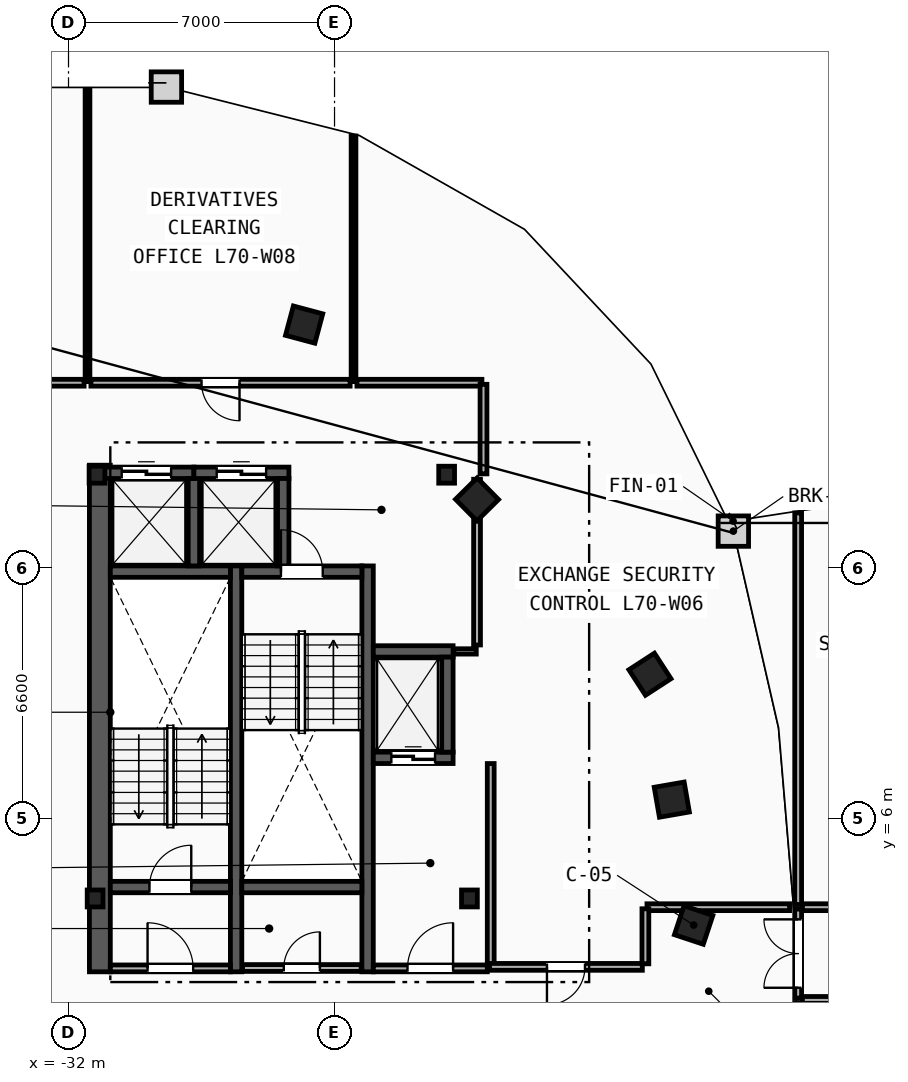
"""IFC4 building model, lengths in metres.
Left out: names, types, materials, properties, quantities, classifications, styles, units other than length and angle.
Written with IfcOpenShell. Run it as: python <this file> out.ifc"""

import sys

from ifc_helpers import new_model, si_unit, direction, frame, frame_2d, origin, origin_2d, place, context, subcontext, project, spatial, rectangle, i_section, extrude, element, fill, save


model = new_model("IFC4")
c1 = context("Model", 3, precision=1e-05, world=origin(), true_north=direction((0.0, 1.0)))
c2 = subcontext(c1, "Body", "Model", "MODEL_VIEW")
j1 = project(units=[si_unit("LENGTHUNIT", "METRE"), si_unit("PLANEANGLEUNIT", "RADIAN")], contexts=[c1])
p1 = place(None, origin())
s1 = spatial("IfcSite", under=j1, at=p1, CompositionType="ELEMENT")
p2 = place(p1, origin())
s2 = spatial("IfcBuilding", under=s1, at=p2, CompositionType="ELEMENT")
p3 = place(p2, frame((0.0, 0.0, 264.8)))
s3 = spatial("IfcBuildingStorey", under=s2, at=p3, CompositionType="ELEMENT", Elevation=264.8)
for number, where, z_axis, x_axis in (
    (1, (-31.3, 3.9, 0.0), (0.0, 0.0, 1.0), (1.0, 0.0, 0.0)),
    (2, (-21.45, 3.9, 0.0), (0.0, 0.0, 1.0), (1.0, 0.0, 0.0)),
    (3, (-22.05, 15.05, 0.0), (0.0, 0.0, 1.0), (1.0, 0.0, 0.0)),
    (4, (-31.25, 15.05, 0.0), (0.0, 0.0, 1.0), (1.0, 0.0, 0.0)),
):
    element("IfcColumn", number, at=place(p3, frame(where, z_axis=z_axis, x_axis=x_axis)), inside=s3, PredefinedType="COLUMN", context=c2, shape_type="SweptSolid", body=[
        extrude(i_section(OverallWidth=0.416, OverallDepth=0.446, WebThickness=0.039, FlangeThickness=0.063, FilletRadius=0.018, at=origin_2d()), origin(), (0.0, 0.0, 1.0), 3.6),
    ])
for number, where, z_axis, x_axis in (
    (5, (-15.55, 3.2, 0.0), (0.0, 0.0, 1.0), (0.315, 0.949, 0.0)),
    (6, (-16.125, 6.5, 0.0), (0.0, 0.0, 1.0), (-0.172, 0.985, 0.0)),
    (7, (-16.7, 9.8, 0.0), (0.0, 0.0, 1.0), (-0.544, 0.839, 0.0)),
    (8, (-21.25, 14.4, 0.0), (0.0, 0.0, 1.0), (-0.703, 0.711, 0.0)),
    (9, (-25.8, 19.0, 0.0), (0.0, 0.0, 1.0), (-0.966, 0.259, 0.0)),
):
    element("IfcColumn", number, at=place(p3, frame(where, z_axis=z_axis, x_axis=x_axis)), inside=s3, PredefinedType="COLUMN", context=c2, shape_type="SweptSolid", body=[
        extrude(rectangle(XDim=0.8, YDim=0.8, at=origin_2d()), origin(), (0.0, 0.0, 1.0), 3.6),
    ])
p4 = place(p3, frame((-31.175, 1.97, 0.0), z_axis=(0.0, 0.0, 1.0), x_axis=(0.0, 1.0, 0.0)))
e10 = element("IfcWall", 10, at=p4, inside=s3, PredefinedType="SHEAR", context=c2, shape_type="SweptSolid", body=[
    extrude(rectangle(XDim=13.33, YDim=0.55, at=frame_2d((6.665, 0.0))), origin(), (0.0, 0.0, 1.0), 3.34),
])
for number, where, z_axis, x_axis in (
    (11, (-27.59, 1.97, 0.0), (0.0, 0.0, 1.0), (0.0, 1.0, 0.0)),
    (12, (-24.13, 1.97, 0.0), (0.0, 0.0, 1.0), (0.0, 1.0, 0.0)),
):
    element("IfcWall", number, at=place(p3, frame(where, z_axis=z_axis, x_axis=x_axis)), inside=s3, PredefinedType="SHEAR", context=c2, shape_type="SweptSolid", body=[
        extrude(rectangle(XDim=10.68, YDim=0.3, at=frame_2d((5.34, 0.0))), origin(), (0.0, 0.0, 1.0), 3.34),
    ])
p5 = place(p3, frame((-30.9, 4.2, 0.0), z_axis=(0.0, 0.0, 1.0), x_axis=(1.0, 0.0, 0.0)))
e13 = element("IfcWall", 13, at=p5, inside=s3, PredefinedType="SHEAR", context=c2, shape_type="SweptSolid", body=[
    extrude(rectangle(XDim=3.16, YDim=0.3, at=frame_2d((1.58, 0.0))), origin(), (0.0, 0.0, 1.0), 3.34),
])
p6 = place(p5, frame((1.03, 0.0, 0.0)))
e14 = element("IfcOpeningElement", 14, at=p6, cuts=e13, PredefinedType="OPENING", context=c2, shape_type="SweptSolid", body=[
    extrude(rectangle(XDim=1.1, YDim=2.15, at=frame_2d((0.55, 1.075))), frame((0.0, 0.16, 0.0), z_axis=(0.0, -1.0, 0.0), x_axis=(1.0, 0.0, 0.0)), (0.0, 0.0, 1.0), 0.32),
])
p7 = place(p3, frame((-30.9, 12.5, 0.0), z_axis=(0.0, 0.0, 1.0), x_axis=(1.0, 0.0, 0.0)))
e15 = element("IfcWall", 15, at=p7, inside=s3, PredefinedType="SHEAR", context=c2, shape_type="SweptSolid", body=[
    extrude(rectangle(XDim=3.16, YDim=0.3, at=frame_2d((1.58, 0.0))), origin(), (0.0, 0.0, 1.0), 3.34),
])
p8 = place(p3, frame((-27.44, 12.5, 0.0), z_axis=(0.0, 0.0, 1.0), x_axis=(1.0, 0.0, 0.0)))
e16 = element("IfcWall", 16, at=p8, inside=s3, PredefinedType="SHEAR", context=c2, shape_type="SweptSolid", body=[
    extrude(rectangle(XDim=3.16, YDim=0.3, at=frame_2d((1.58, 0.0))), origin(), (0.0, 0.0, 1.0), 3.34),
])
p9 = place(p8, frame((1.03, 0.0, 0.0)))
e17 = element("IfcOpeningElement", 17, at=p9, cuts=e16, PredefinedType="OPENING", context=c2, shape_type="SweptSolid", body=[
    extrude(rectangle(XDim=1.1, YDim=2.15, at=frame_2d((0.55, 1.075))), frame((0.0, 0.16, 0.0), z_axis=(0.0, -1.0, 0.0), x_axis=(1.0, 0.0, 0.0)), (0.0, 0.0, 1.0), 0.32),
])
p10 = place(p3, frame((-27.44, 4.2, 0.0), z_axis=(0.0, 0.0, 1.0), x_axis=(1.0, 0.0, 0.0)))
e18 = element("IfcWall", 18, at=p10, inside=s3, PredefinedType="SHEAR", context=c2, shape_type="SweptSolid", body=[
    extrude(rectangle(XDim=3.16, YDim=0.3, at=frame_2d((1.58, 0.0))), origin(), (0.0, 0.0, 1.0), 3.34),
])
p11 = place(p3, frame((-20.89, 2.15, 0.0), z_axis=(0.0, 0.0, 1.0), x_axis=(0.0, 1.0, 0.0)))
e19 = element("IfcWall", 19, at=p11, inside=s3, PredefinedType="PARTITIONING", context=c2, shape_type="SweptSolid", body=[
    extrude(rectangle(XDim=5.3, YDim=0.18, at=frame_2d((2.65, 0.0))), origin(), (0.0, 0.0, 1.0), 3.34),
])
p12 = place(p3, frame((-23.98, 2.06, 0.0), z_axis=(0.0, 0.0, 1.0), x_axis=(1.0, 0.0, 0.0)))
e20 = element("IfcWall", 20, at=p12, inside=s3, PredefinedType="PARTITIONING", context=c2, shape_type="SweptSolid", body=[
    extrude(rectangle(XDim=3.0, YDim=0.18, at=frame_2d((1.5, 0.0))), origin(), (0.0, 0.0, 1.0), 3.34),
])
p13 = place(p12, frame((0.9, 0.0, 0.0)))
e21 = element("IfcOpeningElement", 21, at=p13, cuts=e20, PredefinedType="OPENING", context=c2, shape_type="SweptSolid", body=[
    extrude(rectangle(XDim=1.2, YDim=2.15, at=frame_2d((0.6, 1.075))), frame((0.0, 0.1, 0.0), z_axis=(0.0, -1.0, 0.0), x_axis=(1.0, 0.0, 0.0)), (0.0, 0.0, 1.0), 0.2),
])
p14 = place(p3, frame((-30.9, 2.06, 0.0), z_axis=(0.0, 0.0, 1.0), x_axis=(1.0, 0.0, 0.0)))
e22 = element("IfcWall", 22, at=p14, inside=s3, PredefinedType="PARTITIONING", context=c2, shape_type="SweptSolid", body=[
    extrude(rectangle(XDim=3.16, YDim=0.18, at=frame_2d((1.58, 0.0))), origin(), (0.0, 0.0, 1.0), 3.34),
])
p15 = place(p14, frame((0.98, 0.0, 0.0)))
e23 = element("IfcOpeningElement", 23, at=p15, cuts=e22, PredefinedType="OPENING", context=c2, shape_type="SweptSolid", body=[
    extrude(rectangle(XDim=1.2, YDim=2.15, at=frame_2d((0.6, 1.075))), frame((0.0, 0.1, 0.0), z_axis=(0.0, -1.0, 0.0), x_axis=(1.0, 0.0, 0.0)), (0.0, 0.0, 1.0), 0.2),
])
p16 = place(p3, frame((-23.98, 7.6, 0.0), z_axis=(0.0, 0.0, 1.0), x_axis=(1.0, 0.0, 0.0)))
e24 = element("IfcWall", 24, at=p16, inside=s3, PredefinedType="SHEAR", context=c2, shape_type="SweptSolid", body=[
    extrude(rectangle(XDim=2.1, YDim=0.3, at=frame_2d((1.05, 0.0))), origin(), (0.0, 0.0, 1.0), 3.34),
])
p17 = place(p16, frame((0.475, 0.0, 0.0)))
e25 = element("IfcOpeningElement", 25, at=p17, cuts=e24, PredefinedType="OPENING", context=c2, shape_type="SweptSolid", body=[
    extrude(rectangle(XDim=1.15, YDim=2.2, at=frame_2d((0.575, 1.1))), frame((0.0, 0.16, 0.0), z_axis=(0.0, -1.0, 0.0), x_axis=(1.0, 0.0, 0.0)), (0.0, 0.0, 1.0), 0.32),
])
p18 = place(p3, frame((-23.98, 10.4, 0.0), z_axis=(0.0, 0.0, 1.0), x_axis=(1.0, 0.0, 0.0)))
e26 = element("IfcWall", 26, at=p18, inside=s3, PredefinedType="SHEAR", context=c2, shape_type="SweptSolid", body=[
    extrude(rectangle(XDim=2.1, YDim=0.3, at=frame_2d((1.05, 0.0))), origin(), (0.0, 0.0, 1.0), 3.34),
])
p19 = place(p3, frame((-22.03, 7.75, 0.0), z_axis=(0.0, 0.0, 1.0), x_axis=(0.0, 1.0, 0.0)))
e27 = element("IfcWall", 27, at=p19, inside=s3, PredefinedType="SHEAR", context=c2, shape_type="SweptSolid", body=[
    extrude(rectangle(XDim=2.5, YDim=0.3, at=frame_2d((1.25, 0.0))), origin(), (0.0, 0.0, 1.0), 3.34),
])
p20 = place(p3, frame((-31.2, 15.1, 0.0), z_axis=(0.0, 0.0, 1.0), x_axis=(1.0, 0.0, 0.0)))
e28 = element("IfcWall", 28, at=p20, inside=s3, PredefinedType="SHEAR", context=c2, shape_type="SweptSolid", body=[
    extrude(rectangle(XDim=2.5, YDim=0.3, at=frame_2d((1.25, 0.0))), origin(), (0.0, 0.0, 1.0), 3.34),
])
p21 = place(p20, frame((0.6, 0.0, 0.0)))
e29 = element("IfcOpeningElement", 29, at=p21, cuts=e28, PredefinedType="OPENING", context=c2, shape_type="SweptSolid", body=[
    extrude(rectangle(XDim=1.3, YDim=2.2, at=frame_2d((0.65, 1.1))), frame((0.0, 0.16, 0.0), z_axis=(0.0, -1.0, 0.0), x_axis=(1.0, 0.0, 0.0)), (0.0, 0.0, 1.0), 0.32),
])
p22 = place(p3, frame((-28.7, 12.65, 0.0), z_axis=(0.0, 0.0, 1.0), x_axis=(0.0, 1.0, 0.0)))
e30 = element("IfcWall", 30, at=p22, inside=s3, PredefinedType="SHEAR", context=c2, shape_type="SweptSolid", body=[
    extrude(rectangle(XDim=2.3, YDim=0.3, at=frame_2d((1.15, 0.0))), origin(), (0.0, 0.0, 1.0), 3.34),
])
p23 = place(p3, frame((-28.7, 15.1, 0.0), z_axis=(0.0, 0.0, 1.0), x_axis=(1.0, 0.0, 0.0)))
e31 = element("IfcWall", 31, at=p23, inside=s3, PredefinedType="SHEAR", context=c2, shape_type="SweptSolid", body=[
    extrude(rectangle(XDim=2.5, YDim=0.3, at=frame_2d((1.25, 0.0))), origin(), (0.0, 0.0, 1.0), 3.34),
])
p24 = place(p23, frame((0.6, 0.0, 0.0)))
e32 = element("IfcOpeningElement", 32, at=p24, cuts=e31, PredefinedType="OPENING", context=c2, shape_type="SweptSolid", body=[
    extrude(rectangle(XDim=1.3, YDim=2.2, at=frame_2d((0.65, 1.1))), frame((0.0, 0.16, 0.0), z_axis=(0.0, -1.0, 0.0), x_axis=(1.0, 0.0, 0.0)), (0.0, 0.0, 1.0), 0.32),
])
p25 = place(p3, frame((-26.35, 12.65, 0.0), z_axis=(0.0, 0.0, 1.0), x_axis=(0.0, 1.0, 0.0)))
e33 = element("IfcWall", 33, at=p25, inside=s3, PredefinedType="SHEAR", context=c2, shape_type="SweptSolid", body=[
    extrude(rectangle(XDim=2.3, YDim=0.3, at=frame_2d((1.15, 0.0))), origin(), (0.0, 0.0, 1.0), 3.34),
])
p26 = place(p3, frame((-21.86, 10.4, 0.0), z_axis=(0.0, 0.0, 1.0), x_axis=(1.0, 0.0, 0.0)))
e34 = element("IfcWall", 34, at=p26, inside=s3, PredefinedType="PARTITIONING", context=c2, shape_type="SweptSolid", body=[
    extrude(rectangle(XDim=0.59, YDim=0.14, at=frame_2d((0.295, 0.0))), origin(), (0.0, 0.0, 1.0), 3.34),
])
p27 = place(p3, frame((-21.25, 10.57, 0.0), z_axis=(0.0, 0.0, 1.0), x_axis=(0.0, 1.0, 0.0)))
e35 = element("IfcWall", 35, at=p27, inside=s3, PredefinedType="PARTITIONING", context=c2, shape_type="SweptSolid", body=[
    extrude(rectangle(XDim=4.36, YDim=0.18, at=frame_2d((2.18, 0.0))), origin(), (0.0, 0.0, 1.0), 3.34),
])
p28 = place(p3, frame((-27.42, 2.07, 0.0), z_axis=(0.0, 0.0, 1.0), x_axis=(1.0, 0.0, 0.0)))
e36 = element("IfcWall", 36, at=p28, inside=s3, PredefinedType="PARTITIONING", context=c2, shape_type="SweptSolid", body=[
    extrude(rectangle(XDim=3.12, YDim=0.18, at=frame_2d((1.56, 0.0))), origin(), (0.0, 0.0, 1.0), 3.34),
])
p29 = place(p28, frame((1.085, 0.0, 0.0)))
e37 = element("IfcOpeningElement", 37, at=p29, cuts=e36, PredefinedType="OPENING", context=c2, shape_type="SweptSolid", body=[
    extrude(rectangle(XDim=0.95, YDim=2.1, at=frame_2d((0.475, 1.05))), frame((0.0, 0.1, 0.0), z_axis=(0.0, -1.0, 0.0), x_axis=(1.0, 0.0, 0.0)), (0.0, 0.0, 1.0), 0.2),
])
p30 = place(p3, frame((-31.5, 17.5, 0.0), z_axis=(0.0, 0.0, 1.0), x_axis=(0.0, 1.0, 0.0)))
e38 = element("IfcWall", 38, at=p30, inside=s3, PredefinedType="PARTITIONING", context=c2, shape_type="SweptSolid", body=[
    extrude(rectangle(XDim=7.69, YDim=0.125, at=frame_2d((3.845, 0.0))), origin(), (0.0, 0.0, 1.0), 3.34),
])
p31 = place(p3, frame((-24.5, 17.5, 0.0), z_axis=(0.0, 0.0, 1.0), x_axis=(0.0, 1.0, 0.0)))
e39 = element("IfcWall", 39, at=p31, inside=s3, PredefinedType="PARTITIONING", context=c2, shape_type="SweptSolid", body=[
    extrude(rectangle(XDim=6.463, YDim=0.125, at=frame_2d((3.231, 0.0))), origin(), (0.0, 0.0, 1.0), 3.34),
])
p32 = place(p3, frame((-16.9, 2.1, 0.0), z_axis=(0.0, 0.0, 1.0), x_axis=(-1.0, 0.0, 0.0)))
e40 = element("IfcWall", 40, at=p32, inside=s3, PredefinedType="PARTITIONING", context=c2, shape_type="SweptSolid", body=[
    extrude(rectangle(XDim=4.02, YDim=0.18, at=frame_2d((2.01, 0.0))), origin(), (0.0, 0.0, 1.0), 3.34),
])
p33 = place(p32, frame((1.51, 0.0, 0.0)))
e41 = element("IfcOpeningElement", 41, at=p33, cuts=e40, PredefinedType="OPENING", context=c2, shape_type="SweptSolid", body=[
    extrude(rectangle(XDim=1.0, YDim=2.15, at=frame_2d((0.5, 1.075))), frame((0.0, 0.1, 0.0), z_axis=(0.0, -1.0, 0.0), x_axis=(1.0, 0.0, 0.0)), (0.0, 0.0, 1.0), 0.2),
])
p34 = place(p3, frame((-13.026, 3.67, 0.0), z_axis=(0.0, 0.0, 1.0), x_axis=(-1.0, 0.0, 0.0)))
e42 = element("IfcWall", 42, at=p34, inside=s3, PredefinedType="PARTITIONING", context=c2, shape_type="SweptSolid", body=[
    extrude(rectangle(XDim=3.753, YDim=0.18, at=frame_2d((1.876, 0.0))), origin(), (0.0, 0.0, 1.0), 3.34),
])
p35 = place(p3, frame((-21.122, 17.47, 0.0), z_axis=(0.0, 0.0, 1.0), x_axis=(-1.0, 0.0, 0.0)))
e43 = element("IfcWall", 43, at=p35, inside=s3, PredefinedType="PARTITIONING", context=c2, shape_type="SweptSolid", body=[
    extrude(rectangle(XDim=3.288, YDim=0.18, at=frame_2d((1.644, 0.0))), origin(), (0.0, 0.0, 1.0), 3.34),
])
p36 = place(p3, frame((-21.08, 15.072, 0.0), z_axis=(0.0, 0.0, 1.0), x_axis=(0.0, 1.0, 0.0)))
e44 = element("IfcWall", 44, at=p36, inside=s3, PredefinedType="PARTITIONING", context=c2, shape_type="SweptSolid", body=[
    extrude(rectangle(XDim=2.357, YDim=0.18, at=frame_2d((1.178, 0.0))), origin(), (0.0, 0.0, 1.0), 3.34),
])
p37 = place(p3, frame((-16.82, 3.628, 0.0), z_axis=(0.0, 0.0, 1.0), x_axis=(0.0, -1.0, 0.0)))
e45 = element("IfcWall", 45, at=p37, inside=s3, PredefinedType="PARTITIONING", context=c2, shape_type="SweptSolid", body=[
    extrude(rectangle(XDim=1.448, YDim=0.18, at=frame_2d((0.724, 0.0))), origin(), (0.0, 0.0, 1.0), 3.34),
])
p38 = place(p3, frame((-31.59, 17.47, 0.0), z_axis=(0.0, 0.0, 1.0), x_axis=(-1.0, 0.0, 0.0)))
e46 = element("IfcWall", 46, at=p38, inside=s3, PredefinedType="PARTITIONING", context=c2, shape_type="SweptSolid", body=[
    extrude(rectangle(XDim=2.038, YDim=0.18, at=frame_2d((1.019, 0.0))), origin(), (0.0, 0.0, 1.0), 3.34),
])
p39 = place(p3, frame((-24.59, 17.47, 0.0), z_axis=(0.0, 0.0, 1.0), x_axis=(-1.0, 0.0, 0.0)))
e47 = element("IfcWall", 47, at=p39, inside=s3, PredefinedType="PARTITIONING", context=c2, shape_type="SweptSolid", body=[
    extrude(rectangle(XDim=6.82, YDim=0.18, at=frame_2d((3.41, 0.0))), origin(), (0.0, 0.0, 1.0), 3.34),
])
p40 = place(p39, frame((2.91, 0.0, 0.0)))
e48 = element("IfcOpeningElement", 48, at=p40, cuts=e47, PredefinedType="OPENING", context=c2, shape_type="SweptSolid", body=[
    extrude(rectangle(XDim=1.0, YDim=2.15, at=frame_2d((0.5, 1.075))), frame((0.0, 0.1, 0.0), z_axis=(0.0, -1.0, 0.0), x_axis=(1.0, 0.0, 0.0)), (0.0, 0.0, 1.0), 0.2),
])
p41 = place(p3, frame((-12.688, 1.23, 0.0), z_axis=(0.0, 0.0, 1.0), x_axis=(1.0, 0.0, 0.0)))
e49 = element("IfcWall", 49, at=p41, inside=s3, PredefinedType="PARTITIONING", context=c2, shape_type="SweptSolid", body=[
    extrude(rectangle(XDim=10.394, YDim=0.18, at=frame_2d((5.197, 0.0))), origin(), (0.0, 0.0, 1.0), 2.663),
])
p42 = place(p41, frame((5.68, 0.0, 0.0)))
e50 = element("IfcOpeningElement", 50, at=p42, cuts=e49, PredefinedType="OPENING", context=c2, shape_type="SweptSolid", body=[
    extrude(rectangle(XDim=1.6, YDim=2.2, at=frame_2d((0.8, 1.1))), frame((0.0, 0.1, 0.0), z_axis=(0.0, -1.0, 0.0), x_axis=(1.0, 0.0, 0.0)), (0.0, 0.0, 1.0), 0.2),
])
p43 = place(p3, frame((-2.295, 3.67, 0.0), z_axis=(0.0, 0.0, 1.0), x_axis=(-1.0, 0.0, 0.0)))
e51 = element("IfcWall", 51, at=p43, inside=s3, PredefinedType="PARTITIONING", context=c2, shape_type="SweptSolid", body=[
    extrude(rectangle(XDim=10.394, YDim=0.18, at=frame_2d((5.197, 0.0))), origin(), (0.0, 0.0, 1.0), 3.34),
])
p44 = place(p43, frame((3.114, 0.0, 0.0)))
e52 = element("IfcOpeningElement", 52, at=p44, cuts=e51, PredefinedType="OPENING", context=c2, shape_type="SweptSolid", body=[
    extrude(rectangle(XDim=1.6, YDim=2.2, at=frame_2d((0.8, 1.1))), frame((0.0, 0.1, 0.0), z_axis=(0.0, -1.0, 0.0), x_axis=(1.0, 0.0, 0.0)), (0.0, 0.0, 1.0), 0.2),
])
p45 = place(p3, frame((-12.8, 3.74, 0.0), z_axis=(0.0, 0.0, 1.0), x_axis=(0.0, 1.0, 0.0)))
e53 = element("IfcWall", 53, at=p45, inside=s3, PredefinedType="PARTITIONING", context=c2, shape_type="SweptSolid", body=[
    extrude(rectangle(XDim=10.304, YDim=0.18, at=frame_2d((5.152, 0.0))), origin(), (0.0, 0.0, 1.0), 3.34),
])
p46 = place(p3, frame((-12.8, 1.28, 0.0), z_axis=(0.0, 0.0, 1.0), x_axis=(0.0, 1.0, 0.0)))
e54 = element("IfcWall", 54, at=p46, inside=s3, PredefinedType="PARTITIONING", context=c2, shape_type="SweptSolid", body=[
    extrude(rectangle(XDim=2.34, YDim=0.18, at=frame_2d((1.17, 0.0))), origin(), (0.0, 0.0, 1.0), 3.34),
])
p47 = place(p46, frame((0.27, 0.0, 0.0)))
e55 = element("IfcOpeningElement", 55, at=p47, cuts=e54, PredefinedType="OPENING", context=c2, shape_type="SweptSolid", body=[
    extrude(rectangle(XDim=1.8, YDim=2.25, at=frame_2d((0.9, 1.125))), frame((0.0, 0.1, 0.0), z_axis=(0.0, -1.0, 0.0), x_axis=(1.0, 0.0, 0.0)), (0.0, 0.0, 1.0), 0.2),
])
p48 = place(p6, origin())
e56 = element("IfcDoor", 56, at=p48, inside=s3, OperationType="SINGLE_SWING_RIGHT", PredefinedType="DOOR", context=c2, shape_type="SweptSolid", body=[
    extrude(rectangle(XDim=1.1, YDim=2.15, at=frame_2d((0.55, 1.075))), frame((0.0, 0.025, 0.0), z_axis=(0.0, -1.0, 0.0), x_axis=(1.0, 0.0, 0.0)), (0.0, 0.0, 1.0), 0.05),
])
fill(e14, e56)
p49 = place(p9, origin())
e57 = element("IfcDoor", 57, at=p49, inside=s3, OperationType="SINGLE_SWING_LEFT", PredefinedType="DOOR", context=c2, shape_type="SweptSolid", body=[
    extrude(rectangle(XDim=1.1, YDim=2.15, at=frame_2d((0.55, 1.075))), frame((0.0, 0.025, 0.0), z_axis=(0.0, -1.0, 0.0), x_axis=(1.0, 0.0, 0.0)), (0.0, 0.0, 1.0), 0.05),
])
fill(e17, e57)
p50 = place(p13, origin())
e58 = element("IfcDoor", 58, at=p50, inside=s3, OperationType="SINGLE_SWING_RIGHT", PredefinedType="DOOR", context=c2, shape_type="SweptSolid", body=[
    extrude(rectangle(XDim=1.2, YDim=2.15, at=frame_2d((0.6, 1.075))), frame((0.0, 0.025, 0.0), z_axis=(0.0, -1.0, 0.0), x_axis=(1.0, 0.0, 0.0)), (0.0, 0.0, 1.0), 0.05),
])
fill(e21, e58)
p51 = place(p15, origin())
e59 = element("IfcDoor", 59, at=p51, inside=s3, OperationType="SINGLE_SWING_LEFT", PredefinedType="DOOR", context=c2, shape_type="SweptSolid", body=[
    extrude(rectangle(XDim=1.2, YDim=2.15, at=frame_2d((0.6, 1.075))), frame((0.0, 0.025, 0.0), z_axis=(0.0, -1.0, 0.0), x_axis=(1.0, 0.0, 0.0)), (0.0, 0.0, 1.0), 0.05),
])
fill(e23, e59)
p52 = place(p17, origin())
e60 = element("IfcDoor", 60, at=p52, inside=s3, OperationType="SLIDING_TO_LEFT", PredefinedType="TRAPDOOR", context=c2, shape_type="SweptSolid", body=[
    extrude(rectangle(XDim=1.15, YDim=2.2, at=frame_2d((0.575, 1.1))), frame((0.0, 0.025, 0.0), z_axis=(0.0, -1.0, 0.0), x_axis=(1.0, 0.0, 0.0)), (0.0, 0.0, 1.0), 0.05),
])
fill(e25, e60)
p53 = place(p21, origin())
e61 = element("IfcDoor", 61, at=p53, inside=s3, OperationType="SLIDING_TO_LEFT", PredefinedType="TRAPDOOR", context=c2, shape_type="SweptSolid", body=[
    extrude(rectangle(XDim=1.3, YDim=2.2, at=frame_2d((0.65, 1.1))), frame((0.0, 0.025, 0.0), z_axis=(0.0, -1.0, 0.0), x_axis=(1.0, 0.0, 0.0)), (0.0, 0.0, 1.0), 0.05),
])
fill(e29, e61)
p54 = place(p24, origin())
e62 = element("IfcDoor", 62, at=p54, inside=s3, OperationType="SLIDING_TO_LEFT", PredefinedType="TRAPDOOR", context=c2, shape_type="SweptSolid", body=[
    extrude(rectangle(XDim=1.3, YDim=2.2, at=frame_2d((0.65, 1.1))), frame((0.0, 0.025, 0.0), z_axis=(0.0, -1.0, 0.0), x_axis=(1.0, 0.0, 0.0)), (0.0, 0.0, 1.0), 0.05),
])
fill(e32, e62)
p55 = place(p40, origin())
e63 = element("IfcDoor", 63, at=p55, inside=s3, OperationType="SINGLE_SWING_LEFT", PredefinedType="DOOR", context=c2, shape_type="SweptSolid", body=[
    extrude(rectangle(XDim=1.0, YDim=2.15, at=frame_2d((0.5, 1.075))), frame((0.0, 0.025, 0.0), z_axis=(0.0, -1.0, 0.0), x_axis=(1.0, 0.0, 0.0)), (0.0, 0.0, 1.0), 0.05),
])
fill(e48, e63)
p56 = place(p33, origin())
e64 = element("IfcDoor", 64, at=p56, inside=s3, OperationType="SINGLE_SWING_RIGHT", PredefinedType="DOOR", context=c2, shape_type="SweptSolid", body=[
    extrude(rectangle(XDim=1.0, YDim=2.15, at=frame_2d((0.5, 1.075))), frame((0.0, 0.025, 0.0), z_axis=(0.0, -1.0, 0.0), x_axis=(1.0, 0.0, 0.0)), (0.0, 0.0, 1.0), 0.05),
])
fill(e41, e64)
p57 = place(p29, origin())
e65 = element("IfcDoor", 65, at=p57, inside=s3, OperationType="SINGLE_SWING_RIGHT", PredefinedType="DOOR", context=c2, shape_type="SweptSolid", body=[
    extrude(rectangle(XDim=0.95, YDim=2.1, at=frame_2d((0.475, 1.05))), frame((0.0, 0.025, 0.0), z_axis=(0.0, -1.0, 0.0), x_axis=(1.0, 0.0, 0.0)), (0.0, 0.0, 1.0), 0.05),
])
fill(e37, e65)
p58 = place(p47, origin())
e66 = element("IfcDoor", 66, at=p58, inside=s3, OperationType="DOUBLE_DOOR_SINGLE_SWING", PredefinedType="DOOR", context=c2, shape_type="SweptSolid", body=[
    extrude(rectangle(XDim=1.8, YDim=2.25, at=frame_2d((0.9, 1.125))), frame((0.0, 0.025, 0.0), z_axis=(0.0, -1.0, 0.0), x_axis=(1.0, 0.0, 0.0)), (0.0, 0.0, 1.0), 0.05),
])
fill(e55, e66)
save(model, sys.argv[1])
